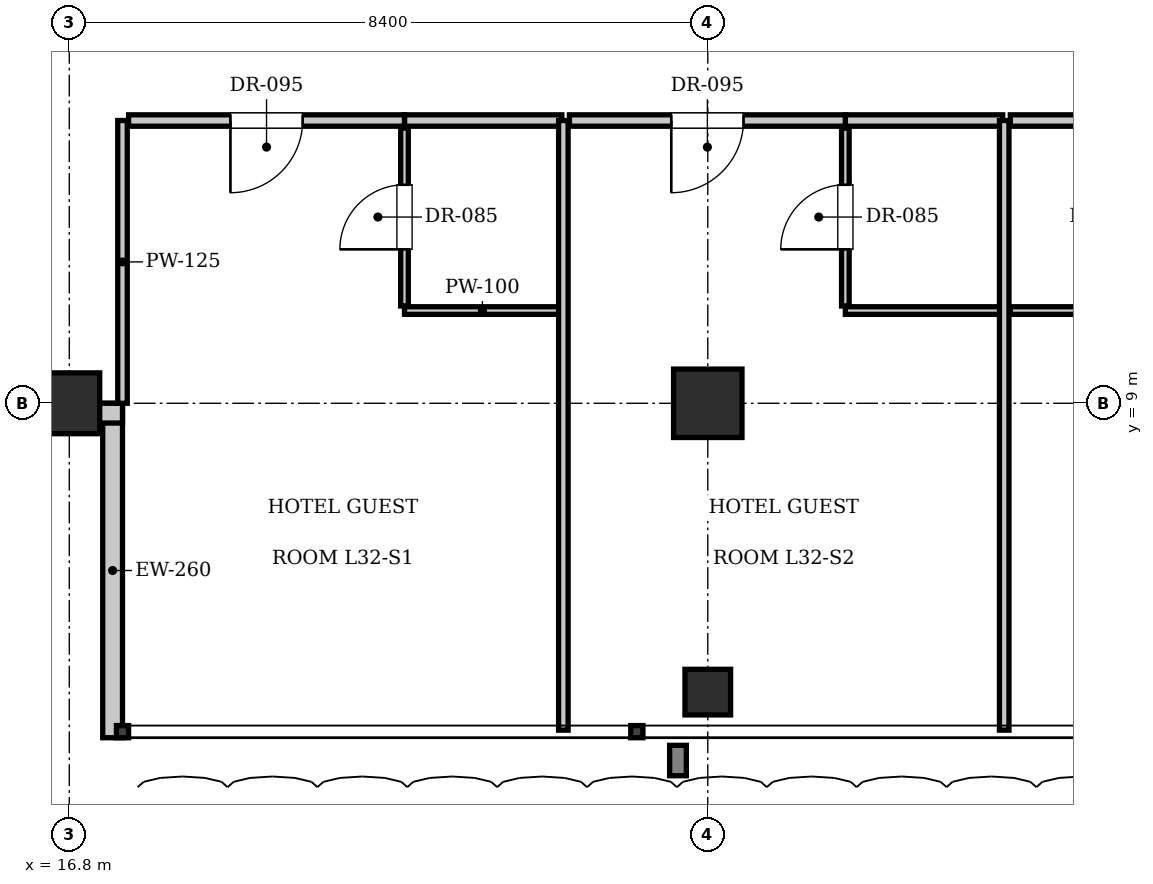
"""IFC4 building model, lengths in metres.
Left out: names, types, materials, properties, quantities, classifications, styles, units other than length and angle.
Written with IfcOpenShell. Run it as: python <this file> out.ifc"""

import sys

from ifc_helpers import new_model, si_unit, direction, frame, frame_2d, origin, origin_2d, place, context, subcontext, project, spatial, rectangle, i_section, extrude, element, fill, save


model = new_model("IFC4")
c1 = context("Model", 3, precision=1e-05, world=origin(), true_north=direction((0.0, 1.0)))
c2 = subcontext(c1, "Body", "Model", "MODEL_VIEW")
j1 = project(units=[si_unit("LENGTHUNIT", "METRE"), si_unit("PLANEANGLEUNIT", "RADIAN")], contexts=[c1])
p1 = place(None, origin())
s1 = spatial("IfcSite", under=j1, at=p1, CompositionType="ELEMENT")
p2 = place(p1, origin())
s2 = spatial("IfcBuilding", under=s1, at=p2, CompositionType="ELEMENT")
p3 = place(p2, frame((0.0, 0.0, 135.1)))
s3 = spatial("IfcBuildingStorey", under=s2, at=p3, CompositionType="ELEMENT", Elevation=135.1)
p4 = place(p3, frame((25.2, 9.0, 0.0), z_axis=(0.0, 0.0, 1.0), x_axis=(1.0, 0.0, 0.0)))
e1 = element("IfcColumn", 1, at=p4, inside=s3, PredefinedType="COLUMN", context=c2, shape_type="SweptSolid", body=[
    extrude(rectangle(XDim=0.9, YDim=0.9, at=origin_2d()), origin(), (0.0, 0.0, 1.0), 3.85),
])
p5 = place(p3, frame((16.8, 9.0, 0.0), z_axis=(0.0, 0.0, 1.0), x_axis=(1.0, 0.0, 0.0)))
e2 = element("IfcColumn", 2, at=p5, inside=s3, PredefinedType="COLUMN", context=c2, shape_type="SweptSolid", body=[
    extrude(rectangle(XDim=0.8, YDim=0.8, at=origin_2d()), origin(), (0.0, 0.0, 1.0), 3.85),
])
p6 = place(p3, frame((25.2, 5.2, 0.0), z_axis=(0.0, 0.0, 1.0), x_axis=(1.0, 0.0, 0.0)))
e3 = element("IfcColumn", 3, at=p6, inside=s3, PredefinedType="COLUMN", context=c2, shape_type="SweptSolid", body=[
    extrude(i_section(OverallWidth=0.6, OverallDepth=0.6, WebThickness=0.025, FlangeThickness=0.038, at=origin_2d()), origin(), (0.0, 0.0, 1.0), 3.85),
])
p7 = place(p3, frame((17.37, 4.6, 0.0), z_axis=(0.0, 0.0, 1.0), x_axis=(0.0, 1.0, 0.0)))
e4 = element("IfcWall", 4, at=p7, inside=s3, PredefinedType="SOLIDWALL", context=c2, shape_type="SweptSolid", body=[
    extrude(rectangle(XDim=4.4, YDim=0.26, at=frame_2d((2.2, 0.0))), origin(), (0.0, 0.0, 1.0), 3.61),
])
p8 = place(p3, frame((17.5, 8.87, 0.0), z_axis=(0.0, 0.0, 1.0), x_axis=(-1.0, 0.0, 0.0)))
e5 = element("IfcWall", 5, at=p8, inside=s3, PredefinedType="SOLIDWALL", context=c2, shape_type="SweptSolid", body=[
    extrude(rectangle(XDim=4.4, YDim=0.26, at=frame_2d((2.2, 0.0))), origin(), (0.0, 0.0, 1.0), 2.998),
])
p9 = place(p3, frame((17.5, 9.0, 0.0), z_axis=(0.0, 0.0, 1.0), x_axis=(0.0, 1.0, 0.0)))
e6 = element("IfcWall", 6, at=p9, inside=s3, PredefinedType="PARTITIONING", context=c2, shape_type="SweptSolid", body=[
    extrude(rectangle(XDim=3.72, YDim=0.125, at=frame_2d((1.86, 0.0))), origin(), (0.0, 0.0, 1.0), 3.61),
])
p10 = place(p3, frame((21.21, 12.72, 0.0), z_axis=(0.0, 0.0, 1.0), x_axis=(1.0, 0.0, 0.0)))
e7 = element("IfcWall", 7, at=p10, inside=s3, PredefinedType="PARTITIONING", context=c2, shape_type="SweptSolid", body=[
    extrude(rectangle(XDim=2.07, YDim=0.15, at=frame_2d((1.035, 0.0))), origin(), (0.0, 0.0, 1.0), 3.61),
])
p11 = place(p3, frame((21.21, 10.22, 0.0), z_axis=(0.0, 0.0, 1.0), x_axis=(1.0, 0.0, 0.0)))
e8 = element("IfcWall", 8, at=p11, inside=s3, PredefinedType="PARTITIONING", context=c2, shape_type="SweptSolid", body=[
    extrude(rectangle(XDim=2.05, YDim=0.1, at=frame_2d((1.025, 0.0))), origin(), (0.0, 0.0, 1.0), 3.61),
])
p12 = place(p3, frame((21.21, 10.28, 0.0), z_axis=(0.0, 0.0, 1.0), x_axis=(0.0, 1.0, 0.0)))
e9 = element("IfcWall", 9, at=p12, inside=s3, PredefinedType="PARTITIONING", context=c2, shape_type="SweptSolid", body=[
    extrude(rectangle(XDim=2.34, YDim=0.1, at=frame_2d((1.17, 0.0))), origin(), (0.0, 0.0, 1.0), 3.61),
])
p13 = place(p12, frame((0.745, 0.0, 0.0)))
e10 = element("IfcOpeningElement", 10, at=p13, cuts=e9, PredefinedType="OPENING", context=c2, shape_type="SweptSolid", body=[
    extrude(rectangle(XDim=0.85, YDim=2.1, at=frame_2d((0.425, 1.05))), frame((0.0, 0.06, 0.0), z_axis=(0.0, -1.0, 0.0), x_axis=(1.0, 0.0, 0.0)), (0.0, 0.0, 1.0), 0.12),
])
p14 = place(p3, frame((17.58, 12.72, 0.0), z_axis=(0.0, 0.0, 1.0), x_axis=(1.0, 0.0, 0.0)))
e11 = element("IfcWall", 11, at=p14, inside=s3, PredefinedType="PARTITIONING", context=c2, shape_type="SweptSolid", body=[
    extrude(rectangle(XDim=3.63, YDim=0.15, at=frame_2d((1.815, 0.0))), origin(), (0.0, 0.0, 1.0), 3.61),
])
p15 = place(p14, frame((1.34, 0.0, 0.0)))
e12 = element("IfcOpeningElement", 12, at=p15, cuts=e11, PredefinedType="OPENING", context=c2, shape_type="SweptSolid", body=[
    extrude(rectangle(XDim=0.95, YDim=2.15, at=frame_2d((0.475, 1.075))), frame((0.0, 0.085, 0.0), z_axis=(0.0, -1.0, 0.0), x_axis=(1.0, 0.0, 0.0)), (0.0, 0.0, 1.0), 0.17),
])
p16 = place(p3, frame((23.3, 4.7, 0.0), z_axis=(0.0, 0.0, 1.0), x_axis=(0.0, 1.0, 0.0)))
e13 = element("IfcWall", 13, at=p16, inside=s3, PredefinedType="PARTITIONING", context=c2, shape_type="SweptSolid", body=[
    extrude(rectangle(XDim=8.02, YDim=0.125, at=frame_2d((4.01, 0.0))), origin(), (0.0, 0.0, 1.0), 3.61),
])
p17 = place(p3, frame((27.01, 12.72, 0.0), z_axis=(0.0, 0.0, 1.0), x_axis=(1.0, 0.0, 0.0)))
e14 = element("IfcWall", 14, at=p17, inside=s3, PredefinedType="PARTITIONING", context=c2, shape_type="SweptSolid", body=[
    extrude(rectangle(XDim=2.07, YDim=0.15, at=frame_2d((1.035, 0.0))), origin(), (0.0, 0.0, 1.0), 3.61),
])
p18 = place(p3, frame((27.01, 10.22, 0.0), z_axis=(0.0, 0.0, 1.0), x_axis=(1.0, 0.0, 0.0)))
e15 = element("IfcWall", 15, at=p18, inside=s3, PredefinedType="PARTITIONING", context=c2, shape_type="SweptSolid", body=[
    extrude(rectangle(XDim=2.05, YDim=0.1, at=frame_2d((1.025, 0.0))), origin(), (0.0, 0.0, 1.0), 3.61),
])
p19 = place(p3, frame((27.01, 10.28, 0.0), z_axis=(0.0, 0.0, 1.0), x_axis=(0.0, 1.0, 0.0)))
e16 = element("IfcWall", 16, at=p19, inside=s3, PredefinedType="PARTITIONING", context=c2, shape_type="SweptSolid", body=[
    extrude(rectangle(XDim=2.34, YDim=0.1, at=frame_2d((1.17, 0.0))), origin(), (0.0, 0.0, 1.0), 3.61),
])
p20 = place(p19, frame((0.745, 0.0, 0.0)))
e17 = element("IfcOpeningElement", 17, at=p20, cuts=e16, PredefinedType="OPENING", context=c2, shape_type="SweptSolid", body=[
    extrude(rectangle(XDim=0.85, YDim=2.1, at=frame_2d((0.425, 1.05))), frame((0.0, 0.06, 0.0), z_axis=(0.0, -1.0, 0.0), x_axis=(1.0, 0.0, 0.0)), (0.0, 0.0, 1.0), 0.12),
])
p21 = place(p3, frame((23.38, 12.72, 0.0), z_axis=(0.0, 0.0, 1.0), x_axis=(1.0, 0.0, 0.0)))
e18 = element("IfcWall", 18, at=p21, inside=s3, PredefinedType="PARTITIONING", context=c2, shape_type="SweptSolid", body=[
    extrude(rectangle(XDim=3.63, YDim=0.15, at=frame_2d((1.815, 0.0))), origin(), (0.0, 0.0, 1.0), 3.61),
])
p22 = place(p21, frame((1.34, 0.0, 0.0)))
e19 = element("IfcOpeningElement", 19, at=p22, cuts=e18, PredefinedType="OPENING", context=c2, shape_type="SweptSolid", body=[
    extrude(rectangle(XDim=0.95, YDim=2.15, at=frame_2d((0.475, 1.075))), frame((0.0, 0.085, 0.0), z_axis=(0.0, -1.0, 0.0), x_axis=(1.0, 0.0, 0.0)), (0.0, 0.0, 1.0), 0.17),
])
p23 = place(p3, frame((29.1, 4.7, 0.0), z_axis=(0.0, 0.0, 1.0), x_axis=(0.0, 1.0, 0.0)))
e20 = element("IfcWall", 20, at=p23, inside=s3, PredefinedType="PARTITIONING", context=c2, shape_type="SweptSolid", body=[
    extrude(rectangle(XDim=8.02, YDim=0.125, at=frame_2d((4.01, 0.0))), origin(), (0.0, 0.0, 1.0), 3.61),
])
p24 = place(p3, frame((29.18, 12.72, 0.0), z_axis=(0.0, 0.0, 1.0), x_axis=(1.0, 0.0, 0.0)))
e21 = element("IfcWall", 21, at=p24, inside=s3, PredefinedType="PARTITIONING", context=c2, shape_type="SweptSolid", body=[
    extrude(rectangle(XDim=2.01, YDim=0.15, at=frame_2d((1.005, 0.0))), origin(), (0.0, 0.0, 1.0), 3.61),
])
p25 = place(p3, frame((29.18, 10.22, 0.0), z_axis=(0.0, 0.0, 1.0), x_axis=(1.0, 0.0, 0.0)))
e22 = element("IfcWall", 22, at=p25, inside=s3, PredefinedType="PARTITIONING", context=c2, shape_type="SweptSolid", body=[
    extrude(rectangle(XDim=2.01, YDim=0.1, at=frame_2d((1.005, 0.0))), origin(), (0.0, 0.0, 1.0), 3.61),
])
p26 = place(p13, origin())
e23 = element("IfcDoor", 23, at=p26, inside=s3, OperationType="SINGLE_SWING_LEFT", PredefinedType="DOOR", context=c2, shape_type="SweptSolid", body=[
    extrude(rectangle(XDim=0.85, YDim=2.1, at=frame_2d((0.425, 1.05))), frame((0.0, 0.025, 0.0), z_axis=(0.0, -1.0, 0.0), x_axis=(1.0, 0.0, 0.0)), (0.0, 0.0, 1.0), 0.05),
])
fill(e10, e23)
p27 = place(p15, frame((0.95, 0.0, 0.0), z_axis=(0.0, 0.0, 1.0), x_axis=(-1.0, 0.0, 0.0)))
e24 = element("IfcDoor", 24, at=p27, inside=s3, OperationType="SINGLE_SWING_RIGHT", PredefinedType="DOOR", context=c2, shape_type="SweptSolid", body=[
    extrude(rectangle(XDim=0.95, YDim=2.15, at=frame_2d((0.475, 1.075))), frame((0.0, 0.025, 0.0), z_axis=(0.0, -1.0, 0.0), x_axis=(1.0, 0.0, 0.0)), (0.0, 0.0, 1.0), 0.05),
])
fill(e12, e24)
p28 = place(p20, origin())
e25 = element("IfcDoor", 25, at=p28, inside=s3, OperationType="SINGLE_SWING_LEFT", PredefinedType="DOOR", context=c2, shape_type="SweptSolid", body=[
    extrude(rectangle(XDim=0.85, YDim=2.1, at=frame_2d((0.425, 1.05))), frame((0.0, 0.025, 0.0), z_axis=(0.0, -1.0, 0.0), x_axis=(1.0, 0.0, 0.0)), (0.0, 0.0, 1.0), 0.05),
])
fill(e17, e25)
p29 = place(p22, frame((0.95, 0.0, 0.0), z_axis=(0.0, 0.0, 1.0), x_axis=(-1.0, 0.0, 0.0)))
e26 = element("IfcDoor", 26, at=p29, inside=s3, OperationType="SINGLE_SWING_RIGHT", PredefinedType="DOOR", context=c2, shape_type="SweptSolid", body=[
    extrude(rectangle(XDim=0.95, YDim=2.15, at=frame_2d((0.475, 1.075))), frame((0.0, 0.025, 0.0), z_axis=(0.0, -1.0, 0.0), x_axis=(1.0, 0.0, 0.0)), (0.0, 0.0, 1.0), 0.05),
])
fill(e19, e26)
save(model, sys.argv[1])
